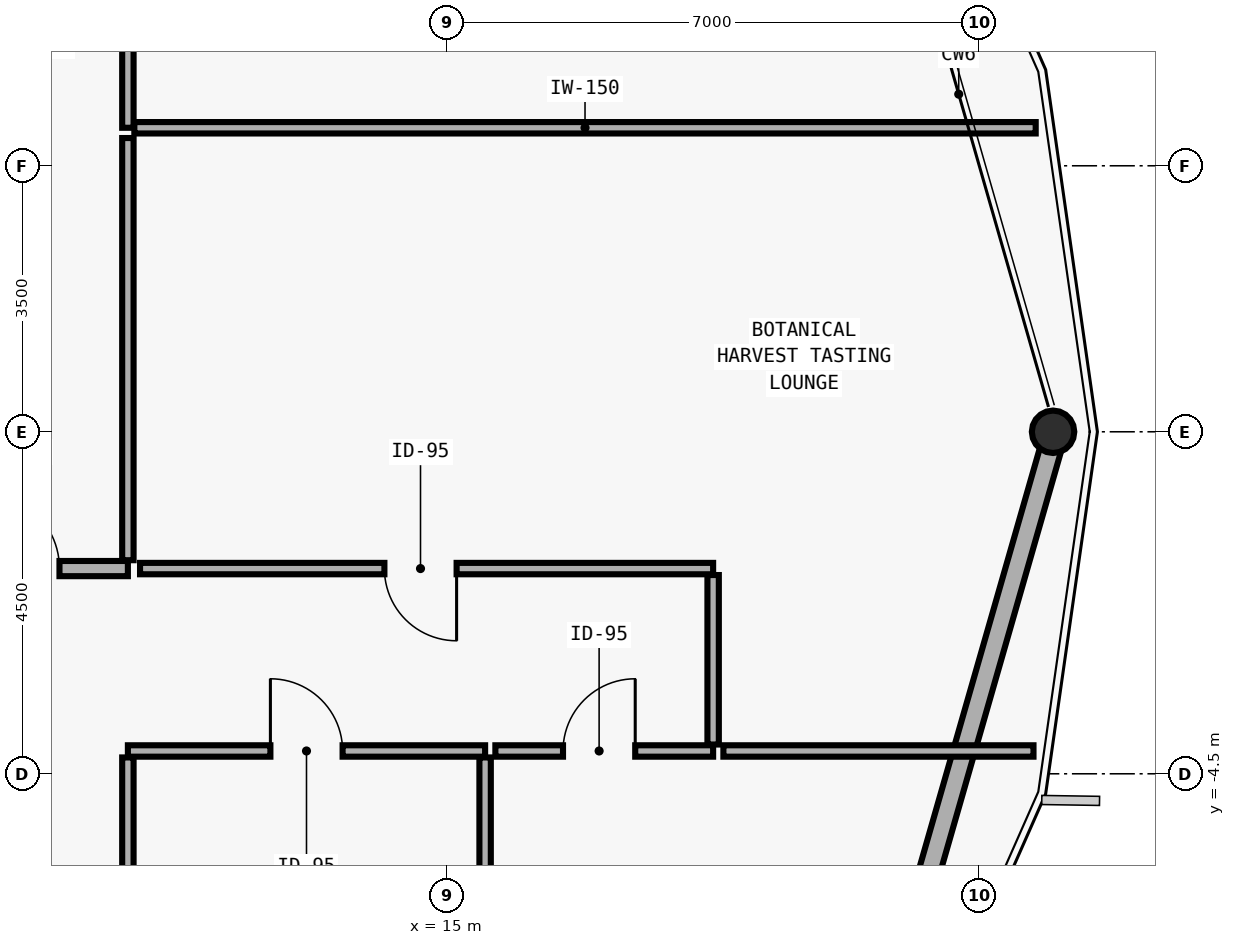
"""IFC4 building model, lengths in metres.
Left out: names, types, materials, properties, quantities, classifications, styles, units other than length and angle.
Written with IfcOpenShell. Run it as: python <this file> out.ifc"""

import sys

from ifc_helpers import new_model, si_unit, direction, frame, frame_2d, origin, origin_2d, place, context, subcontext, project, spatial, rectangle, hollow_circle, extrude, element, fill, save


model = new_model("IFC4")
c1 = context("Model", 3, precision=1e-05, world=origin(), true_north=direction((0.0, 1.0)))
c2 = subcontext(c1, "Body", "Model", "MODEL_VIEW")
j1 = project(units=[si_unit("LENGTHUNIT", "METRE"), si_unit("PLANEANGLEUNIT", "RADIAN")], contexts=[c1])
p1 = place(None, origin())
s1 = spatial("IfcSite", under=j1, at=p1, CompositionType="ELEMENT")
p2 = place(p1, origin())
s2 = spatial("IfcBuilding", under=s1, at=p2, CompositionType="ELEMENT")
p3 = place(p2, frame((0.0, 0.0, 267.0)))
s3 = spatial("IfcBuildingStorey", under=s2, at=p3, CompositionType="ELEMENT", Elevation=267.0)
p4 = place(p3, frame((23.006, 0.0, 0.0), z_axis=(-0.018776993553, 0.0, 0.999823696715), x_axis=(0.0, -1.0, 0.0)))
e1 = element("IfcColumn", 1, at=p4, inside=s3, PredefinedType="COLUMN", context=c2, shape_type="SweptSolid", body=[
    extrude(hollow_circle(Radius=0.28, WallThickness=0.02, at=origin_2d()), origin(), (0.0, 0.0, 1.0), 3.576),
])
p5 = place(p3, frame((22.941, -0.225, 0.0), z_axis=(0.0, 0.0, 1.0), x_axis=(-0.275841867593, -0.961203029585, 0.0)))
e2 = element("IfcWall", 2, at=p5, inside=s3, PredefinedType="SOLIDWALL", context=c2, shape_type="SweptSolid", body=[
    extrude(rectangle(XDim=8.774, YDim=0.28, at=frame_2d((4.387, 0.0))), origin(), (0.0, 0.0, 1.0), 2.97),
])
p6 = place(p3, frame((8.16, -1.8, 0.0), z_axis=(0.0, 0.0, 1.0), x_axis=(1.0, 0.0, 0.0)))
e3 = element("IfcWall", 3, at=p6, inside=s3, PredefinedType="MOVABLE", context=c2, shape_type="SweptSolid", body=[
    extrude(rectangle(XDim=2.64, YDim=0.2, at=frame_2d((1.32, 0.0))), origin(), (0.0, 0.0, 1.0), 3.36),
])
p7 = place(p6, frame((0.74, 0.0, 0.0)))
e4 = element("IfcOpeningElement", 4, at=p7, cuts=e3, PredefinedType="OPENING", context=c2, shape_type="SweptSolid", body=[
    extrude(rectangle(XDim=1.0, YDim=2.1, at=frame_2d((0.5, 1.05))), frame((0.0, 0.11, 0.0), z_axis=(0.0, -1.0, 0.0), x_axis=(1.0, 0.0, 0.0)), (0.0, 0.0, 1.0), 0.22),
])
p8 = place(p3, frame((10.8, -4.2, 0.0), z_axis=(0.0, 0.0, 1.0), x_axis=(1.0, 0.0, 0.0)))
e5 = element("IfcWall", 5, at=p8, inside=s3, PredefinedType="PARTITIONING", context=c2, shape_type="SweptSolid", body=[
    extrude(rectangle(XDim=4.7, YDim=0.15, at=frame_2d((2.35, 0.0))), origin(), (0.0, 0.0, 1.0), 3.36),
])
p9 = place(p8, frame((1.875, 0.0, 0.0)))
e6 = element("IfcOpeningElement", 6, at=p9, cuts=e5, PredefinedType="OPENING", context=c2, shape_type="SweptSolid", body=[
    extrude(rectangle(XDim=0.95, YDim=2.1, at=frame_2d((0.475, 1.05))), frame((0.0, 0.085, 0.0), z_axis=(0.0, -1.0, 0.0), x_axis=(1.0, 0.0, 0.0)), (0.0, 0.0, 1.0), 0.17),
])
p10 = place(p3, frame((15.635, -4.2, 0.0), z_axis=(0.0, 0.0, 1.0), x_axis=(1.0, 0.0, 0.0)))
e7 = element("IfcWall", 7, at=p10, inside=s3, PredefinedType="PARTITIONING", context=c2, shape_type="SweptSolid", body=[
    extrude(rectangle(XDim=2.865, YDim=0.15, at=frame_2d((1.433, 0.0))), origin(), (0.0, 0.0, 1.0), 3.36),
])
p11 = place(p10, frame((0.89, 0.0, 0.0)))
e8 = element("IfcOpeningElement", 8, at=p11, cuts=e7, PredefinedType="OPENING", context=c2, shape_type="SweptSolid", body=[
    extrude(rectangle(XDim=0.95, YDim=2.1, at=frame_2d((0.475, 1.05))), frame((0.0, 0.085, 0.0), z_axis=(0.0, -1.0, 0.0), x_axis=(1.0, 0.0, 0.0)), (0.0, 0.0, 1.0), 0.17),
])
p12 = place(p3, frame((18.5, -1.8, 0.0), z_axis=(0.0, 0.0, 1.0), x_axis=(-1.0, 0.0, 0.0)))
e9 = element("IfcWall", 9, at=p12, inside=s3, PredefinedType="PARTITIONING", context=c2, shape_type="SweptSolid", body=[
    extrude(rectangle(XDim=7.54, YDim=0.15, at=frame_2d((3.77, 0.0))), origin(), (0.0, 0.0, 1.0), 3.36),
])
p13 = place(p12, frame((3.375, 0.0, 0.0)))
e10 = element("IfcOpeningElement", 10, at=p13, cuts=e9, PredefinedType="OPENING", context=c2, shape_type="SweptSolid", body=[
    extrude(rectangle(XDim=0.95, YDim=2.1, at=frame_2d((0.475, 1.05))), frame((0.0, 0.085, 0.0), z_axis=(0.0, -1.0, 0.0), x_axis=(1.0, 0.0, 0.0)), (0.0, 0.0, 1.0), 0.17),
])
p14 = place(p3, frame((10.8, 4.0, 0.0), z_axis=(0.0, 0.0, 1.0), x_axis=(0.0, 1.0, 0.0)))
e11 = element("IfcWall", 11, at=p14, inside=s3, PredefinedType="PARTITIONING", context=c2, shape_type="SweptSolid", body=[
    extrude(rectangle(XDim=8.5, YDim=0.15, at=frame_2d((4.25, 0.0))), origin(), (0.0, 0.0, 1.0), 3.36),
])
p15 = place(p14, frame((3.775, 0.0, 0.0)))
e12 = element("IfcOpeningElement", 12, at=p15, cuts=e11, PredefinedType="OPENING", context=c2, shape_type="SweptSolid", body=[
    extrude(rectangle(XDim=0.95, YDim=2.1, at=frame_2d((0.475, 1.05))), frame((0.0, 0.085, 0.0), z_axis=(0.0, -1.0, 0.0), x_axis=(1.0, 0.0, 0.0)), (0.0, 0.0, 1.0), 0.17),
])
p16 = place(p3, frame((10.8, -6.6, 0.0), z_axis=(0.0, 0.0, 1.0), x_axis=(0.0, 1.0, 0.0)))
e13 = element("IfcWall", 13, at=p16, inside=s3, PredefinedType="PARTITIONING", context=c2, shape_type="SweptSolid", body=[
    extrude(rectangle(XDim=2.315, YDim=0.15, at=frame_2d((1.158, 0.0))), origin(), (0.0, 0.0, 1.0), 3.36),
])
p17 = place(p3, frame((15.5, -4.285, 0.0), z_axis=(0.0, 0.0, 1.0), x_axis=(0.0, -1.0, 0.0)))
e14 = element("IfcWall", 14, at=p17, inside=s3, PredefinedType="PARTITIONING", context=c2, shape_type="SweptSolid", body=[
    extrude(rectangle(XDim=10.226, YDim=0.15, at=frame_2d((5.113, 0.0))), origin(), (0.0, 0.0, 1.0), 3.072),
])
p18 = place(p3, frame((18.635, -4.2, 0.0), z_axis=(0.0, 0.0, 1.0), x_axis=(1.0, 0.0, 0.0)))
e15 = element("IfcWall", 15, at=p18, inside=s3, PredefinedType="PARTITIONING", context=c2, shape_type="SweptSolid", body=[
    extrude(rectangle(XDim=4.08, YDim=0.15, at=frame_2d((2.04, 0.0))), origin(), (0.0, 0.0, 1.0), 3.36),
])
p19 = place(p3, frame((18.5, -4.115, 0.0), z_axis=(0.0, 0.0, 1.0), x_axis=(0.0, 1.0, 0.0)))
e16 = element("IfcWall", 16, at=p19, inside=s3, PredefinedType="PARTITIONING", context=c2, shape_type="SweptSolid", body=[
    extrude(rectangle(XDim=2.23, YDim=0.15, at=frame_2d((1.115, 0.0))), origin(), (0.0, 0.0, 1.0), 3.36),
])
p20 = place(p3, frame((10.8, -1.69, 0.0), z_axis=(0.0, 0.0, 1.0), x_axis=(0.0, 1.0, 0.0)))
e17 = element("IfcWall", 17, at=p20, inside=s3, PredefinedType="PARTITIONING", context=c2, shape_type="SweptSolid", body=[
    extrude(rectangle(XDim=5.555, YDim=0.15, at=frame_2d((2.777, 0.0))), origin(), (0.0, 0.0, 1.0), 3.36),
])
p21 = place(p3, frame((10.885, 4.0, 0.0), z_axis=(0.0, 0.0, 1.0), x_axis=(1.0, 0.0, 0.0)))
e18 = element("IfcWall", 18, at=p21, inside=s3, PredefinedType="PARTITIONING", context=c2, shape_type="SweptSolid", body=[
    extrude(rectangle(XDim=11.859, YDim=0.15, at=frame_2d((5.929, 0.0))), origin(), (0.0, 0.0, 1.0), 3.36),
])
p22 = place(p7, origin())
e19 = element("IfcDoor", 19, at=p22, inside=s3, OperationType="SINGLE_SWING_LEFT", PredefinedType="DOOR", context=c2, shape_type="SweptSolid", body=[
    extrude(rectangle(XDim=1.0, YDim=2.1, at=frame_2d((0.5, 1.05))), frame((0.0, 0.025, 0.0), z_axis=(0.0, -1.0, 0.0), x_axis=(1.0, 0.0, 0.0)), (0.0, 0.0, 1.0), 0.05),
])
fill(e4, e19)
p23 = place(p9, origin())
e20 = element("IfcDoor", 20, at=p23, inside=s3, OperationType="SINGLE_SWING_LEFT", PredefinedType="DOOR", context=c2, shape_type="SweptSolid", body=[
    extrude(rectangle(XDim=0.95, YDim=2.1, at=frame_2d((0.475, 1.05))), frame((0.0, 0.025, 0.0), z_axis=(0.0, -1.0, 0.0), x_axis=(1.0, 0.0, 0.0)), (0.0, 0.0, 1.0), 0.05),
])
fill(e6, e20)
p24 = place(p11, origin())
e21 = element("IfcDoor", 21, at=p24, inside=s3, OperationType="SINGLE_SWING_RIGHT", PredefinedType="DOOR", context=c2, shape_type="SweptSolid", body=[
    extrude(rectangle(XDim=0.95, YDim=2.1, at=frame_2d((0.475, 1.05))), frame((0.0, 0.025, 0.0), z_axis=(0.0, -1.0, 0.0), x_axis=(1.0, 0.0, 0.0)), (0.0, 0.0, 1.0), 0.05),
])
fill(e8, e21)
p25 = place(p13, origin())
e22 = element("IfcDoor", 22, at=p25, inside=s3, OperationType="SINGLE_SWING_LEFT", PredefinedType="DOOR", context=c2, shape_type="SweptSolid", body=[
    extrude(rectangle(XDim=0.95, YDim=2.1, at=frame_2d((0.475, 1.05))), frame((0.0, 0.025, 0.0), z_axis=(0.0, -1.0, 0.0), x_axis=(1.0, 0.0, 0.0)), (0.0, 0.0, 1.0), 0.05),
])
fill(e10, e22)
save(model, sys.argv[1])
